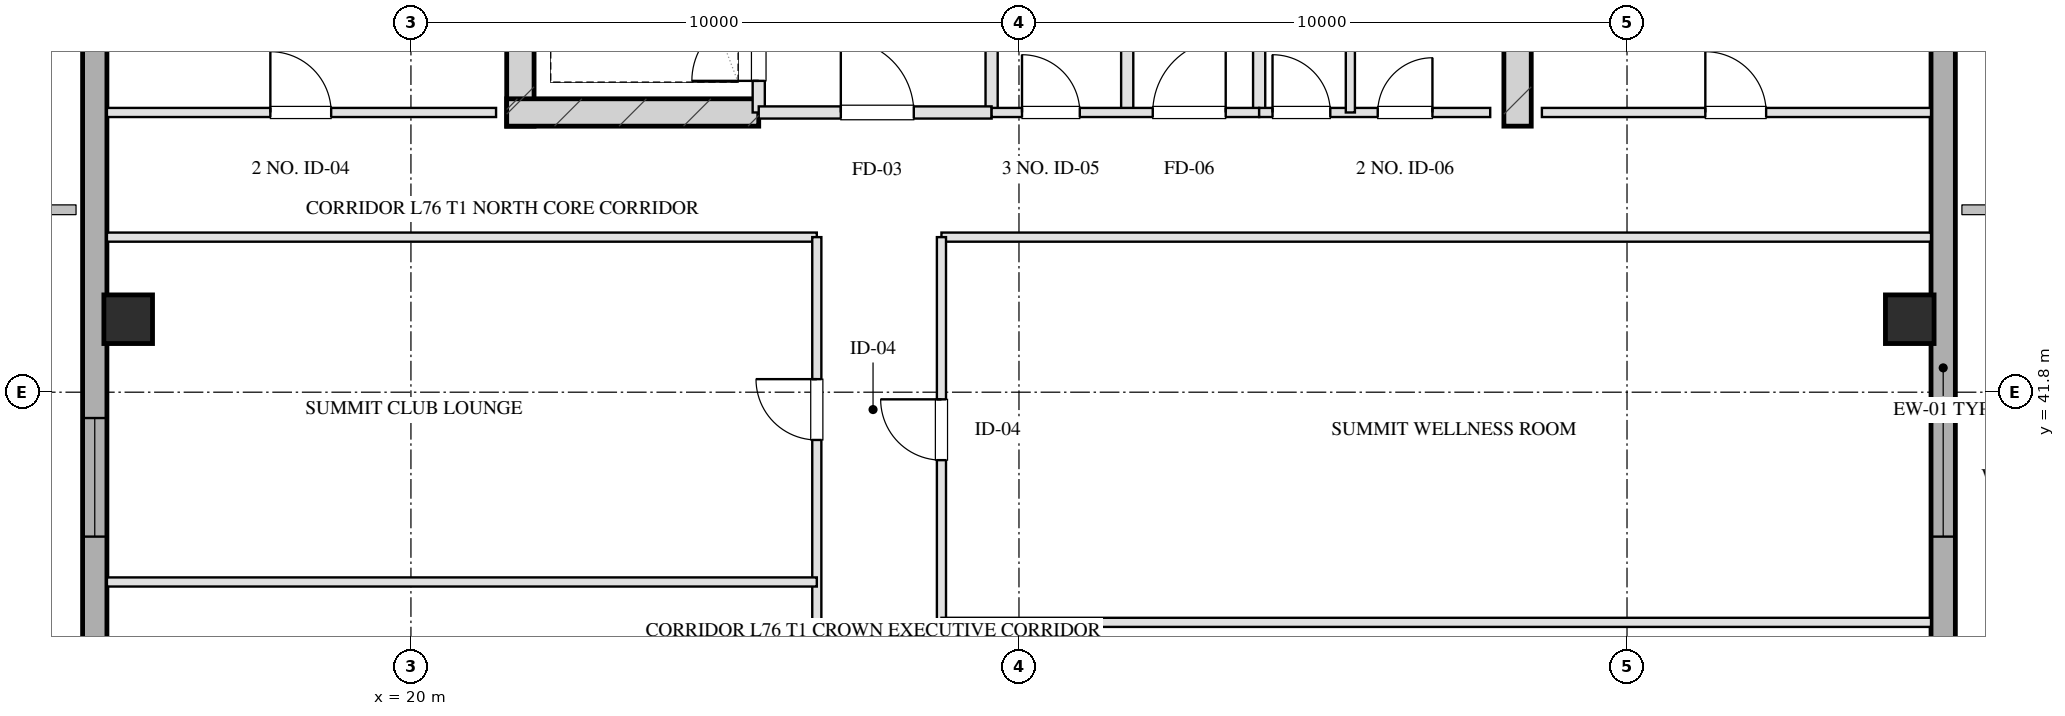
"""IFC4 building model, lengths in metres.
Left out: names, types, materials, properties, quantities, classifications, styles, units other than length and angle.
Written with IfcOpenShell. Run it as: python <this file> out.ifc"""

import sys

from ifc_helpers import new_model, si_unit, direction, frame, frame_2d, origin, origin_2d, place, context, subcontext, project, spatial, rectangle, hollow_rectangle, extrude, element, fill, save


model = new_model("IFC4")
c1 = context("Model", 3, precision=1e-05, world=origin(), true_north=direction((0.0, 1.0)))
c2 = subcontext(c1, "Body", "Model", "MODEL_VIEW")
j1 = project(units=[si_unit("LENGTHUNIT", "METRE"), si_unit("PLANEANGLEUNIT", "RADIAN")], contexts=[c1])
p1 = place(None, origin())
s1 = spatial("IfcSite", under=j1, at=p1, CompositionType="ELEMENT")
p2 = place(p1, origin())
s2 = spatial("IfcBuilding", under=s1, at=p2, CompositionType="ELEMENT")
p3 = place(p2, frame((0.0, 0.0, 276.0)))
s3 = spatial("IfcBuildingStorey", under=s2, at=p3, CompositionType="ELEMENT", Elevation=276.0)
for number, where, z_axis, x_axis in (
    (1, (21.8, 46.175, 0.0), (0.0, 0.0, 1.0), (0.0, 1.0, 0.0)),
    (2, (38.2, 46.175, 0.0), (0.0, 0.0, 1.0), (0.0, 1.0, 0.0)),
):
    element("IfcWall", number, at=place(p3, frame(where, z_axis=z_axis, x_axis=x_axis)), inside=s3, PredefinedType="SHEAR", context=c2, shape_type="SweptSolid", body=[
        extrude(rectangle(XDim=9.33, YDim=0.45, at=frame_2d((4.665, 0.0))), origin(), (0.0, 0.0, 1.0), 4.2),
    ])
p4 = place(p3, frame((21.575, 46.4, 0.0), z_axis=(0.0, 0.0, 1.0), x_axis=(1.0, 0.0, 0.0)))
e3 = element("IfcWall", 3, at=p4, inside=s3, PredefinedType="SHEAR", context=c2, shape_type="SweptSolid", body=[
    extrude(rectangle(XDim=4.145, YDim=0.45, at=frame_2d((2.073, 0.0))), origin(), (0.0, 0.0, 1.0), 4.2),
])
for number, where, z_axis, x_axis in (
    (4, (15.35, 43.0, 0.0), (0.0, 0.0, 1.0), (1.0, 0.0, 0.0)),
    (5, (44.65, 43.0, 0.0), (0.0, 0.0, 1.0), (1.0, 0.0, 0.0)),
):
    element("IfcColumn", number, at=place(p3, frame(where, z_axis=z_axis, x_axis=x_axis)), inside=s3, PredefinedType="COLUMN", context=c2, shape_type="SweptSolid", body=[
        extrude(hollow_rectangle(XDim=0.8, YDim=0.8, WallThickness=0.028, at=origin_2d()), origin(), (0.0, 0.0, 1.0), 4.201),
    ])
p5 = place(p3, frame((14.8, 13.1, 0.0), z_axis=(0.0, 0.0, 1.0), x_axis=(0.0, 1.0, 0.0)))
e6 = element("IfcWall", 6, at=p5, inside=s3, PredefinedType="SOLIDWALL", context=c2, shape_type="SweptSolid", body=[
    extrude(rectangle(XDim=41.8, YDim=0.4, at=frame_2d((20.9, 0.0))), origin(), (0.0, 0.0, 1.0), 3.33),
])
p6 = place(p5, frame((22.525, 0.0, 0.75)))
e7 = element("IfcOpeningElement", 7, at=p6, cuts=e6, PredefinedType="OPENING", context=c2, shape_type="SweptSolid", body=[
    extrude(rectangle(XDim=1.95, YDim=1.65, at=frame_2d((0.975, 0.825))), frame((0.0, 0.21, 0.0), z_axis=(0.0, -1.0, 0.0), x_axis=(1.0, 0.0, 0.0)), (0.0, 0.0, 1.0), 0.42),
])
p7 = place(p5, frame((26.325, 0.0, 0.75)))
e8 = element("IfcOpeningElement", 8, at=p7, cuts=e6, PredefinedType="OPENING", context=c2, shape_type="SweptSolid", body=[
    extrude(rectangle(XDim=1.95, YDim=1.65, at=frame_2d((0.975, 0.825))), frame((0.0, 0.21, 0.0), z_axis=(0.0, -1.0, 0.0), x_axis=(1.0, 0.0, 0.0)), (0.0, 0.0, 1.0), 0.42),
])
p8 = place(p5, frame((17.25, 0.0, 0.0)))
e9 = element("IfcOpeningElement", 9, at=p8, cuts=e6, PredefinedType="OPENING", context=c2, shape_type="SweptSolid", body=[
    extrude(rectangle(XDim=1.1, YDim=2.15, at=frame_2d((0.55, 1.075))), frame((0.0, 0.21, 0.0), z_axis=(0.0, -1.0, 0.0), x_axis=(1.0, 0.0, 0.0)), (0.0, 0.0, 1.0), 0.42),
])
p9 = place(p3, frame((45.2, 54.9, 0.0), z_axis=(0.0, 0.0, 1.0), x_axis=(0.0, -1.0, 0.0)))
e10 = element("IfcWall", 10, at=p9, inside=s3, PredefinedType="SOLIDWALL", context=c2, shape_type="SweptSolid", body=[
    extrude(rectangle(XDim=41.8, YDim=0.4, at=frame_2d((20.9, 0.0))), origin(), (0.0, 0.0, 1.0), 3.33),
])
p10 = place(p9, frame((17.325, 0.0, 0.75)))
e11 = element("IfcOpeningElement", 11, at=p10, cuts=e10, PredefinedType="OPENING", context=c2, shape_type="SweptSolid", body=[
    extrude(rectangle(XDim=1.95, YDim=1.65, at=frame_2d((0.975, 0.825))), frame((0.0, 0.21, 0.0), z_axis=(0.0, -1.0, 0.0), x_axis=(1.0, 0.0, 0.0)), (0.0, 0.0, 1.0), 0.42),
])
p11 = place(p9, frame((13.525, 0.0, 0.75)))
e12 = element("IfcOpeningElement", 12, at=p11, cuts=e10, PredefinedType="OPENING", context=c2, shape_type="SweptSolid", body=[
    extrude(rectangle(XDim=1.95, YDim=1.65, at=frame_2d((0.975, 0.825))), frame((0.0, 0.21, 0.0), z_axis=(0.0, -1.0, 0.0), x_axis=(1.0, 0.0, 0.0)), (0.0, 0.0, 1.0), 0.42),
])
p12 = place(p9, frame((26.15, 0.0, 0.0)))
e13 = element("IfcOpeningElement", 13, at=p12, cuts=e10, PredefinedType="OPENING", context=c2, shape_type="SweptSolid", body=[
    extrude(rectangle(XDim=1.1, YDim=2.15, at=frame_2d((0.55, 1.075))), frame((0.0, 0.21, 0.0), z_axis=(0.0, -1.0, 0.0), x_axis=(1.0, 0.0, 0.0)), (0.0, 0.0, 1.0), 0.42),
])
p13 = place(p3, frame((25.72, 46.4, 0.0), z_axis=(0.0, 0.0, 1.0), x_axis=(0.0, 1.0, 0.0)))
e14 = element("IfcWall", 14, at=p13, inside=s3, PredefinedType="PARTITIONING", context=c2, shape_type="SweptSolid", body=[
    extrude(rectangle(XDim=1.9, YDim=0.2, at=frame_2d((0.95, 0.0))), origin(), (0.0, 0.0, 1.0), 3.925),
])
p14 = place(p13, frame((0.52, 0.0, 0.0)))
e15 = element("IfcOpeningElement", 15, at=p14, cuts=e14, PredefinedType="OPENING", context=c2, shape_type="SweptSolid", body=[
    extrude(rectangle(XDim=1.1, YDim=2.05, at=frame_2d((0.55, 1.025))), frame((0.0, 0.11, 0.0), z_axis=(0.0, -1.0, 0.0), x_axis=(1.0, 0.0, 0.0)), (0.0, 0.0, 1.0), 0.22),
])
p15 = place(p3, frame((29.55, 46.4, 0.0), z_axis=(0.0, 0.0, 1.0), x_axis=(0.0, 1.0, 0.0)))
e16 = element("IfcWall", 16, at=p15, inside=s3, PredefinedType="PARTITIONING", context=c2, shape_type="SweptSolid", body=[
    extrude(rectangle(XDim=8.43, YDim=0.2, at=frame_2d((4.215, 0.0))), origin(), (0.0, 0.0, 1.0), 3.925),
])
p16 = place(p3, frame((25.72, 46.4, 0.0), z_axis=(0.0, 0.0, 1.0), x_axis=(1.0, 0.0, 0.0)))
e17 = element("IfcWall", 17, at=p16, inside=s3, PredefinedType="PARTITIONING", context=c2, shape_type="SweptSolid", body=[
    extrude(rectangle(XDim=3.83, YDim=0.2, at=frame_2d((1.915, 0.0))), origin(), (0.0, 0.0, 1.0), 3.925),
])
p17 = place(p16, frame((1.35, 0.0, 0.0)))
e18 = element("IfcOpeningElement", 18, at=p17, cuts=e17, PredefinedType="OPENING", context=c2, shape_type="SweptSolid", body=[
    extrude(rectangle(XDim=1.2, YDim=2.05, at=frame_2d((0.6, 1.025))), frame((0.0, 0.11, 0.0), z_axis=(0.0, -1.0, 0.0), x_axis=(1.0, 0.0, 0.0)), (0.0, 0.0, 1.0), 0.22),
])
for number, where, z_axis, x_axis in (
    (19, (33.95, 46.4, 0.0), (0.0, 0.0, 1.0), (0.0, 1.0, 0.0)),
    (20, (31.78, 46.4, 0.0), (0.0, 0.0, 1.0), (0.0, 1.0, 0.0)),
):
    element("IfcWall", number, at=place(p3, frame(where, z_axis=z_axis, x_axis=x_axis)), inside=s3, PredefinedType="PARTITIONING", context=c2, shape_type="SweptSolid", body=[
        extrude(rectangle(XDim=8.43, YDim=0.2, at=frame_2d((4.215, 0.0))), origin(), (0.0, 0.0, 1.0), 3.925),
    ])
p18 = place(p3, frame((29.55, 46.4, 0.0), z_axis=(0.0, 0.0, 1.0), x_axis=(1.0, 0.0, 0.0)))
e21 = element("IfcWall", 21, at=p18, inside=s3, PredefinedType="PARTITIONING", context=c2, shape_type="SweptSolid", body=[
    extrude(rectangle(XDim=4.4, YDim=0.15, at=frame_2d((2.2, 0.0))), origin(), (0.0, 0.0, 1.0), 3.925),
])
p19 = place(p18, frame((0.5, 0.0, 0.0)))
e22 = element("IfcOpeningElement", 22, at=p19, cuts=e21, PredefinedType="OPENING", context=c2, shape_type="SweptSolid", body=[
    extrude(rectangle(XDim=0.95, YDim=2.05, at=frame_2d((0.475, 1.025))), frame((0.0, 0.085, 0.0), z_axis=(0.0, -1.0, 0.0), x_axis=(1.0, 0.0, 0.0)), (0.0, 0.0, 1.0), 0.17),
])
p20 = place(p18, frame((2.65, 0.0, 0.0)))
e23 = element("IfcOpeningElement", 23, at=p20, cuts=e21, PredefinedType="OPENING", context=c2, shape_type="SweptSolid", body=[
    extrude(rectangle(XDim=1.2, YDim=2.05, at=frame_2d((0.6, 1.025))), frame((0.0, 0.085, 0.0), z_axis=(0.0, -1.0, 0.0), x_axis=(1.0, 0.0, 0.0)), (0.0, 0.0, 1.0), 0.17),
])
p21 = place(p3, frame((33.95, 46.4, 0.0), z_axis=(0.0, 0.0, 1.0), x_axis=(1.0, 0.0, 0.0)))
e24 = element("IfcWall", 24, at=p21, inside=s3, PredefinedType="PARTITIONING", context=c2, shape_type="SweptSolid", body=[
    extrude(rectangle(XDim=3.8, YDim=0.15, at=frame_2d((1.9, 0.0))), origin(), (0.0, 0.0, 1.0), 3.925),
])
p22 = place(p21, frame((0.22, 0.0, 0.0)))
e25 = element("IfcOpeningElement", 25, at=p22, cuts=e24, PredefinedType="OPENING", context=c2, shape_type="SweptSolid", body=[
    extrude(rectangle(XDim=0.95, YDim=2.05, at=frame_2d((0.475, 1.025))), frame((0.0, 0.085, 0.0), z_axis=(0.0, -1.0, 0.0), x_axis=(1.0, 0.0, 0.0)), (0.0, 0.0, 1.0), 0.17),
])
p23 = place(p21, frame((1.95, 0.0, 0.0)))
e26 = element("IfcOpeningElement", 26, at=p23, cuts=e24, PredefinedType="OPENING", context=c2, shape_type="SweptSolid", body=[
    extrude(rectangle(XDim=0.9, YDim=2.05, at=frame_2d((0.45, 1.025))), frame((0.0, 0.085, 0.0), z_axis=(0.0, -1.0, 0.0), x_axis=(1.0, 0.0, 0.0)), (0.0, 0.0, 1.0), 0.17),
])
p24 = place(p3, frame((35.45, 46.4, 0.0), z_axis=(0.0, 0.0, 1.0), x_axis=(0.0, 1.0, 0.0)))
e27 = element("IfcWall", 27, at=p24, inside=s3, PredefinedType="PARTITIONING", context=c2, shape_type="SweptSolid", body=[
    extrude(rectangle(XDim=8.43, YDim=0.15, at=frame_2d((4.215, 0.0))), origin(), (0.0, 0.0, 1.0), 3.515),
])
p25 = place(p24, frame((2.55, 0.0, 0.0)))
e28 = element("IfcOpeningElement", 28, at=p25, cuts=e27, PredefinedType="OPENING", context=c2, shape_type="SweptSolid", body=[
    extrude(rectangle(XDim=0.95, YDim=2.05, at=frame_2d((0.475, 1.025))), frame((0.0, 0.085, 0.0), z_axis=(0.0, -1.0, 0.0), x_axis=(1.0, 0.0, 0.0)), (0.0, 0.0, 1.0), 0.17),
])
p26 = place(p24, frame((5.6, 0.0, 0.0)))
e29 = element("IfcOpeningElement", 29, at=p26, cuts=e27, PredefinedType="OPENING", context=c2, shape_type="SweptSolid", body=[
    extrude(rectangle(XDim=0.9, YDim=2.05, at=frame_2d((0.45, 1.025))), frame((0.0, 0.085, 0.0), z_axis=(0.0, -1.0, 0.0), x_axis=(1.0, 0.0, 0.0)), (0.0, 0.0, 1.0), 0.17),
])
p27 = place(p3, frame((15.0, 46.4, 0.0), z_axis=(0.0, 0.0, 1.0), x_axis=(1.0, 0.0, 0.0)))
e30 = element("IfcWall", 30, at=p27, inside=s3, PredefinedType="PARTITIONING", context=c2, shape_type="SweptSolid", body=[
    extrude(rectangle(XDim=6.4, YDim=0.15, at=frame_2d((3.2, 0.0))), origin(), (0.0, 0.0, 1.0), 3.925),
])
p28 = place(p27, frame((2.688, 0.0, 0.0)))
e31 = element("IfcOpeningElement", 31, at=p28, cuts=e30, PredefinedType="OPENING", context=c2, shape_type="SweptSolid", body=[
    extrude(rectangle(XDim=1.0, YDim=2.05, at=frame_2d((0.5, 1.025))), frame((0.0, 0.085, 0.0), z_axis=(0.0, -1.0, 0.0), x_axis=(1.0, 0.0, 0.0)), (0.0, 0.0, 1.0), 0.17),
])
p29 = place(p3, frame((38.6, 46.4, 0.0), z_axis=(0.0, 0.0, 1.0), x_axis=(1.0, 0.0, 0.0)))
e32 = element("IfcWall", 32, at=p29, inside=s3, PredefinedType="PARTITIONING", context=c2, shape_type="SweptSolid", body=[
    extrude(rectangle(XDim=6.4, YDim=0.15, at=frame_2d((3.2, 0.0))), origin(), (0.0, 0.0, 1.0), 3.925),
])
p30 = place(p29, frame((2.688, 0.0, 0.0)))
e33 = element("IfcOpeningElement", 33, at=p30, cuts=e32, PredefinedType="OPENING", context=c2, shape_type="SweptSolid", body=[
    extrude(rectangle(XDim=1.0, YDim=2.05, at=frame_2d((0.5, 1.025))), frame((0.0, 0.085, 0.0), z_axis=(0.0, -1.0, 0.0), x_axis=(1.0, 0.0, 0.0)), (0.0, 0.0, 1.0), 0.17),
])
p31 = place(p3, frame((15.0, 44.35, 0.0), z_axis=(0.0, 0.0, 1.0), x_axis=(1.0, 0.0, 0.0)))
e34 = element("IfcWall", 34, at=p31, inside=s3, PredefinedType="PARTITIONING", context=c2, shape_type="SweptSolid", body=[
    extrude(rectangle(XDim=11.675, YDim=0.15, at=frame_2d((5.837, 0.0))), origin(), (0.0, 0.0, 1.0), 3.925),
])
p32 = place(p3, frame((28.725, 44.35, 0.0), z_axis=(0.0, 0.0, 1.0), x_axis=(1.0, 0.0, 0.0)))
e35 = element("IfcWall", 35, at=p32, inside=s3, PredefinedType="PARTITIONING", context=c2, shape_type="SweptSolid", body=[
    extrude(rectangle(XDim=16.275, YDim=0.15, at=frame_2d((8.137, 0.0))), origin(), (0.0, 0.0, 1.0), 3.925),
])
p33 = place(p3, frame((26.675, 23.65, 0.0), z_axis=(0.0, 0.0, 1.0), x_axis=(0.0, 1.0, 0.0)))
e36 = element("IfcWall", 36, at=p33, inside=s3, PredefinedType="PARTITIONING", context=c2, shape_type="SweptSolid", body=[
    extrude(rectangle(XDim=20.7, YDim=0.15, at=frame_2d((10.35, 0.0))), origin(), (0.0, 0.0, 1.0), 3.925),
])
p34 = place(p33, frame((2.175, 0.0, 0.0)))
e37 = element("IfcOpeningElement", 37, at=p34, cuts=e36, PredefinedType="OPENING", context=c2, shape_type="SweptSolid", body=[
    extrude(rectangle(XDim=1.0, YDim=2.05, at=frame_2d((0.5, 1.025))), frame((0.0, 0.085, 0.0), z_axis=(0.0, -1.0, 0.0), x_axis=(1.0, 0.0, 0.0)), (0.0, 0.0, 1.0), 0.17),
])
p35 = place(p33, frame((6.999, 0.0, 0.0)))
e38 = element("IfcOpeningElement", 38, at=p35, cuts=e36, PredefinedType="OPENING", context=c2, shape_type="SweptSolid", body=[
    extrude(rectangle(XDim=1.05, YDim=2.05, at=frame_2d((0.525, 1.025))), frame((0.0, 0.085, 0.0), z_axis=(0.0, -1.0, 0.0), x_axis=(1.0, 0.0, 0.0)), (0.0, 0.0, 1.0), 0.17),
])
p36 = place(p33, frame((11.838, 0.0, 0.0)))
e39 = element("IfcOpeningElement", 39, at=p36, cuts=e36, PredefinedType="OPENING", context=c2, shape_type="SweptSolid", body=[
    extrude(rectangle(XDim=1.0, YDim=2.05, at=frame_2d((0.5, 1.025))), frame((0.0, 0.085, 0.0), z_axis=(0.0, -1.0, 0.0), x_axis=(1.0, 0.0, 0.0)), (0.0, 0.0, 1.0), 0.17),
])
p37 = place(p33, frame((17.365, 0.0, 0.0)))
e40 = element("IfcOpeningElement", 40, at=p37, cuts=e36, PredefinedType="OPENING", context=c2, shape_type="SweptSolid", body=[
    extrude(rectangle(XDim=1.0, YDim=2.05, at=frame_2d((0.5, 1.025))), frame((0.0, 0.085, 0.0), z_axis=(0.0, -1.0, 0.0), x_axis=(1.0, 0.0, 0.0)), (0.0, 0.0, 1.0), 0.17),
])
p38 = place(p3, frame((28.725, 23.65, 0.0), z_axis=(0.0, 0.0, 1.0), x_axis=(0.0, 1.0, 0.0)))
e41 = element("IfcWall", 41, at=p38, inside=s3, PredefinedType="PARTITIONING", context=c2, shape_type="SweptSolid", body=[
    extrude(rectangle(XDim=20.7, YDim=0.15, at=frame_2d((10.35, 0.0))), origin(), (0.0, 0.0, 1.0), 3.925),
])
p39 = place(p38, frame((2.675, 0.0, 0.0)))
e42 = element("IfcOpeningElement", 42, at=p39, cuts=e41, PredefinedType="OPENING", context=c2, shape_type="SweptSolid", body=[
    extrude(rectangle(XDim=0.85, YDim=2.05, at=frame_2d((0.425, 1.025))), frame((0.0, 0.085, 0.0), z_axis=(0.0, -1.0, 0.0), x_axis=(1.0, 0.0, 0.0)), (0.0, 0.0, 1.0), 0.17),
])
p40 = place(p38, frame((9.857, 0.0, 0.0)))
e43 = element("IfcOpeningElement", 43, at=p40, cuts=e41, PredefinedType="OPENING", context=c2, shape_type="SweptSolid", body=[
    extrude(rectangle(XDim=1.0, YDim=2.05, at=frame_2d((0.5, 1.025))), frame((0.0, 0.085, 0.0), z_axis=(0.0, -1.0, 0.0), x_axis=(1.0, 0.0, 0.0)), (0.0, 0.0, 1.0), 0.17),
])
p41 = place(p38, frame((17.032, 0.0, 0.0)))
e44 = element("IfcOpeningElement", 44, at=p41, cuts=e41, PredefinedType="OPENING", context=c2, shape_type="SweptSolid", body=[
    extrude(rectangle(XDim=1.0, YDim=2.05, at=frame_2d((0.5, 1.025))), frame((0.0, 0.085, 0.0), z_axis=(0.0, -1.0, 0.0), x_axis=(1.0, 0.0, 0.0)), (0.0, 0.0, 1.0), 0.17),
])
p42 = place(p3, frame((15.0, 38.679, 0.0), z_axis=(0.0, 0.0, 1.0), x_axis=(1.0, 0.0, 0.0)))
e45 = element("IfcWall", 45, at=p42, inside=s3, PredefinedType="PARTITIONING", context=c2, shape_type="SweptSolid", body=[
    extrude(rectangle(XDim=11.675, YDim=0.15, at=frame_2d((5.837, 0.0))), origin(), (0.0, 0.0, 1.0), 3.925),
])
p43 = place(p3, frame((28.725, 38.015, 0.0), z_axis=(0.0, 0.0, 1.0), x_axis=(1.0, 0.0, 0.0)))
e46 = element("IfcWall", 46, at=p43, inside=s3, PredefinedType="PARTITIONING", context=c2, shape_type="SweptSolid", body=[
    extrude(rectangle(XDim=16.275, YDim=0.15, at=frame_2d((8.137, 0.0))), origin(), (0.0, 0.0, 1.0), 3.925),
])
p44 = place(p7, origin())
e47 = element("IfcWindow", 47, at=p44, inside=s3, PartitioningType="TRIPLE_PANEL_VERTICAL", PredefinedType="WINDOW", context=c2, shape_type="SweptSolid", body=[
    extrude(rectangle(XDim=1.95, YDim=1.65, at=frame_2d((0.975, 0.825))), frame((0.0, 0.03, 0.0), z_axis=(0.0, -1.0, 0.0), x_axis=(1.0, 0.0, 0.0)), (0.0, 0.0, 1.0), 0.06),
])
fill(e8, e47)
p45 = place(p11, origin())
e48 = element("IfcWindow", 48, at=p45, inside=s3, PartitioningType="TRIPLE_PANEL_VERTICAL", PredefinedType="WINDOW", context=c2, shape_type="SweptSolid", body=[
    extrude(rectangle(XDim=1.95, YDim=1.65, at=frame_2d((0.975, 0.825))), frame((0.0, 0.03, 0.0), z_axis=(0.0, -1.0, 0.0), x_axis=(1.0, 0.0, 0.0)), (0.0, 0.0, 1.0), 0.06),
])
fill(e12, e48)
p46 = place(p14, origin())
e49 = element("IfcDoor", 49, at=p46, inside=s3, OperationType="SINGLE_SWING_LEFT", PredefinedType="DOOR", context=c2, shape_type="SweptSolid", body=[
    extrude(rectangle(XDim=1.1, YDim=2.05, at=frame_2d((0.55, 1.025))), frame((0.0, 0.025, 0.0), z_axis=(0.0, -1.0, 0.0), x_axis=(1.0, 0.0, 0.0)), (0.0, 0.0, 1.0), 0.05),
])
fill(e15, e49)
p47 = place(p17, origin())
e50 = element("IfcDoor", 50, at=p47, inside=s3, OperationType="SINGLE_SWING_LEFT", PredefinedType="DOOR", context=c2, shape_type="SweptSolid", body=[
    extrude(rectangle(XDim=1.2, YDim=2.05, at=frame_2d((0.6, 1.025))), frame((0.0, 0.025, 0.0), z_axis=(0.0, -1.0, 0.0), x_axis=(1.0, 0.0, 0.0)), (0.0, 0.0, 1.0), 0.05),
])
fill(e18, e50)
p48 = place(p19, origin())
e51 = element("IfcDoor", 51, at=p48, inside=s3, OperationType="SINGLE_SWING_LEFT", PredefinedType="DOOR", context=c2, shape_type="SweptSolid", body=[
    extrude(rectangle(XDim=0.95, YDim=2.05, at=frame_2d((0.475, 1.025))), frame((0.0, 0.025, 0.0), z_axis=(0.0, -1.0, 0.0), x_axis=(1.0, 0.0, 0.0)), (0.0, 0.0, 1.0), 0.05),
])
fill(e22, e51)
p49 = place(p20, origin())
e52 = element("IfcDoor", 52, at=p49, inside=s3, OperationType="SINGLE_SWING_RIGHT", PredefinedType="DOOR", context=c2, shape_type="SweptSolid", body=[
    extrude(rectangle(XDim=1.2, YDim=2.05, at=frame_2d((0.6, 1.025))), frame((0.0, 0.025, 0.0), z_axis=(0.0, -1.0, 0.0), x_axis=(1.0, 0.0, 0.0)), (0.0, 0.0, 1.0), 0.05),
])
fill(e23, e52)
p50 = place(p22, origin())
e53 = element("IfcDoor", 53, at=p50, inside=s3, OperationType="SINGLE_SWING_LEFT", PredefinedType="DOOR", context=c2, shape_type="SweptSolid", body=[
    extrude(rectangle(XDim=0.95, YDim=2.05, at=frame_2d((0.475, 1.025))), frame((0.0, 0.025, 0.0), z_axis=(0.0, -1.0, 0.0), x_axis=(1.0, 0.0, 0.0)), (0.0, 0.0, 1.0), 0.05),
])
fill(e25, e53)
p51 = place(p23, origin())
e54 = element("IfcDoor", 54, at=p51, inside=s3, OperationType="SINGLE_SWING_RIGHT", PredefinedType="DOOR", context=c2, shape_type="SweptSolid", body=[
    extrude(rectangle(XDim=0.9, YDim=2.05, at=frame_2d((0.45, 1.025))), frame((0.0, 0.025, 0.0), z_axis=(0.0, -1.0, 0.0), x_axis=(1.0, 0.0, 0.0)), (0.0, 0.0, 1.0), 0.05),
])
fill(e26, e54)
p52 = place(p28, origin())
e55 = element("IfcDoor", 55, at=p52, inside=s3, OperationType="SINGLE_SWING_LEFT", PredefinedType="DOOR", context=c2, shape_type="SweptSolid", body=[
    extrude(rectangle(XDim=1.0, YDim=2.05, at=frame_2d((0.5, 1.025))), frame((0.0, 0.025, 0.0), z_axis=(0.0, -1.0, 0.0), x_axis=(1.0, 0.0, 0.0)), (0.0, 0.0, 1.0), 0.05),
])
fill(e31, e55)
p53 = place(p30, origin())
e56 = element("IfcDoor", 56, at=p53, inside=s3, OperationType="SINGLE_SWING_LEFT", PredefinedType="DOOR", context=c2, shape_type="SweptSolid", body=[
    extrude(rectangle(XDim=1.0, YDim=2.05, at=frame_2d((0.5, 1.025))), frame((0.0, 0.025, 0.0), z_axis=(0.0, -1.0, 0.0), x_axis=(1.0, 0.0, 0.0)), (0.0, 0.0, 1.0), 0.05),
])
fill(e33, e56)
p54 = place(p37, origin())
e57 = element("IfcDoor", 57, at=p54, inside=s3, OperationType="SINGLE_SWING_RIGHT", PredefinedType="DOOR", context=c2, shape_type="SweptSolid", body=[
    extrude(rectangle(XDim=1.0, YDim=2.05, at=frame_2d((0.5, 1.025))), frame((0.0, 0.025, 0.0), z_axis=(0.0, -1.0, 0.0), x_axis=(1.0, 0.0, 0.0)), (0.0, 0.0, 1.0), 0.05),
])
fill(e40, e57)
p55 = place(p41, origin())
e58 = element("IfcDoor", 58, at=p55, inside=s3, OperationType="SINGLE_SWING_RIGHT", PredefinedType="DOOR", context=c2, shape_type="SweptSolid", body=[
    extrude(rectangle(XDim=1.0, YDim=2.05, at=frame_2d((0.5, 1.025))), frame((0.0, 0.025, 0.0), z_axis=(0.0, -1.0, 0.0), x_axis=(1.0, 0.0, 0.0)), (0.0, 0.0, 1.0), 0.05),
])
fill(e44, e58)
save(model, sys.argv[1])
